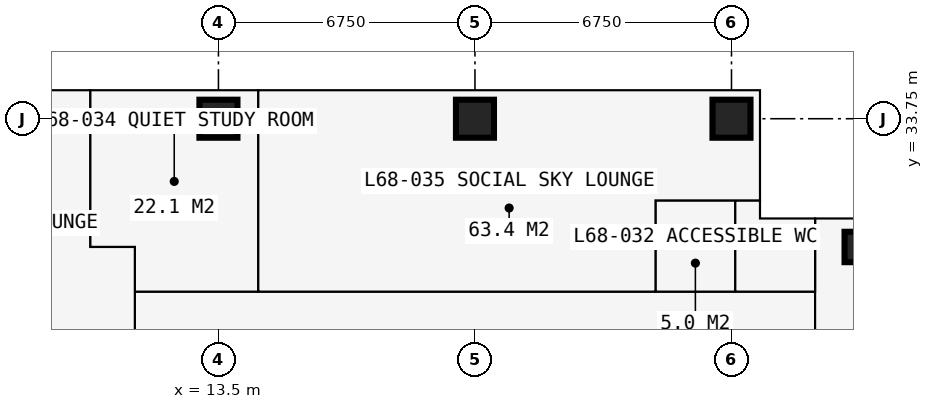
"""IFC4 building model, lengths in metres.
Left out: names, types, materials, properties, quantities, classifications, styles, units other than length and angle.
Written with IfcOpenShell. Run it as: python <this file> out.ifc"""

import sys

from ifc_helpers import new_model, si_unit, direction, frame, frame_2d, origin, origin_2d, place, context, subcontext, project, spatial, rectangle, extrude, element, fill, save


model = new_model("IFC4")
c1 = context("Model", 3, precision=1e-05, world=origin(), true_north=direction((0.0, 1.0)))
c2 = subcontext(c1, "Body", "Model", "MODEL_VIEW")
j1 = project(units=[si_unit("LENGTHUNIT", "METRE"), si_unit("PLANEANGLEUNIT", "RADIAN")], contexts=[c1])
p1 = place(None, origin())
s1 = spatial("IfcSite", under=j1, at=p1, CompositionType="ELEMENT")
p2 = place(p1, origin())
s2 = spatial("IfcBuilding", under=s1, at=p2, CompositionType="ELEMENT")
p3 = place(p2, frame((0.0, 0.0, 251.1)))
s3 = spatial("IfcBuildingStorey", under=s2, at=p3, CompositionType="ELEMENT", Elevation=251.1)
for number, where, z_axis, x_axis in (
    (1, (13.5, 33.75, 0.0), (0.0, 0.0, 1.0), (1.0, 0.0, 0.0)),
    (2, (20.25, 33.75, 0.0), (0.0, 0.0, 1.0), (1.0, 0.0, 0.0)),
    (3, (27.0, 33.75, 0.0), (0.0, 0.0, 1.0), (1.0, 0.0, 0.0)),
):
    element("IfcColumn", number, at=place(p3, frame(where, z_axis=z_axis, x_axis=x_axis)), inside=s3, PredefinedType="COLUMN", context=c2, shape_type="SweptSolid", body=[
        extrude(rectangle(XDim=1.0, YDim=1.0, at=origin_2d()), origin(), (0.0, 0.0, 1.0), 3.6),
    ])
p4 = place(p3, frame((30.375, 30.375, 0.0), z_axis=(0.0, 0.0, 1.0), x_axis=(1.0, 0.0, 0.0)))
e4 = element("IfcColumn", 4, at=p4, inside=s3, PredefinedType="COLUMN", context=c2, shape_type="SweptSolid", body=[
    extrude(rectangle(XDim=0.8, YDim=0.8, at=origin_2d()), origin(), (0.0, 0.0, 1.0), 3.6),
])
p5 = place(p3, frame((31.125, 31.125, 0.0), z_axis=(0.0, 0.0, 1.0), x_axis=(-1.0, 0.0, 0.0)))
e5 = element("IfcWall", 5, at=p5, inside=s3, PredefinedType="SOLIDWALL", context=c2, shape_type="SweptSolid", body=[
    extrude(rectangle(XDim=3.375, YDim=0.3, at=frame_2d((1.688, 0.0))), origin(), (0.0, 0.0, 1.0), 3.3),
])
p6 = place(p5, frame((0.212, 0.0, 0.9)))
e6 = element("IfcOpeningElement", 6, at=p6, cuts=e5, PredefinedType="OPENING", context=c2, shape_type="SweptSolid", body=[
    extrude(rectangle(XDim=1.5, YDim=1.8, at=frame_2d((0.75, 0.9))), frame((0.0, 0.16, 0.0), z_axis=(0.0, -1.0, 0.0), x_axis=(1.0, 0.0, 0.0)), (0.0, 0.0, 1.0), 0.32),
])
p7 = place(p3, frame((27.75, 31.125, 0.0), z_axis=(0.0, 0.0, 1.0), x_axis=(0.0, 1.0, 0.0)))
e7 = element("IfcWall", 7, at=p7, inside=s3, PredefinedType="SOLIDWALL", context=c2, shape_type="SweptSolid", body=[
    extrude(rectangle(XDim=3.375, YDim=0.3, at=frame_2d((1.688, 0.0))), origin(), (0.0, 0.0, 1.0), 3.3),
])
p8 = place(p7, frame((0.788, 0.0, 0.6)))
e8 = element("IfcOpeningElement", 8, at=p8, cuts=e7, PredefinedType="OPENING", context=c2, shape_type="SweptSolid", body=[
    extrude(rectangle(XDim=1.8, YDim=2.1, at=frame_2d((0.9, 1.05))), frame((0.0, 0.16, 0.0), z_axis=(0.0, -1.0, 0.0), x_axis=(1.0, 0.0, 0.0)), (0.0, 0.0, 1.0), 0.32),
])
p9 = place(p3, frame((13.5, 34.5, 0.0), z_axis=(0.0, 0.0, 1.0), x_axis=(1.0, 0.0, 0.0)))
e9 = element("IfcWall", 9, at=p9, inside=s3, PredefinedType="SOLIDWALL", context=c2, shape_type="SweptSolid", body=[
    extrude(rectangle(XDim=6.75, YDim=0.15, at=frame_2d((3.375, 0.0))), origin(), (0.0, 0.0, 1.0), 3.3),
])
p10 = place(p9, frame((0.363, 0.0, 0.0)))
e10 = element("IfcOpeningElement", 10, at=p10, cuts=e9, PredefinedType="OPENING", context=c2, shape_type="SweptSolid", body=[
    extrude(rectangle(XDim=1.0, YDim=2.2, at=frame_2d((0.5, 1.1))), frame((0.0, 0.085, 0.0), z_axis=(0.0, -1.0, 0.0), x_axis=(1.0, 0.0, 0.0)), (0.0, 0.0, 1.0), 0.17),
])
p11 = place(p9, frame((1.725, 0.0, 0.9)))
e11 = element("IfcOpeningElement", 11, at=p11, cuts=e9, PredefinedType="OPENING", context=c2, shape_type="SweptSolid", body=[
    extrude(rectangle(XDim=1.2, YDim=1.8, at=frame_2d((0.6, 0.9))), frame((0.0, 0.085, 0.0), z_axis=(0.0, -1.0, 0.0), x_axis=(1.0, 0.0, 0.0)), (0.0, 0.0, 1.0), 0.17),
])
p12 = place(p9, frame((5.387, 0.0, 0.0)))
e12 = element("IfcOpeningElement", 12, at=p12, cuts=e9, PredefinedType="OPENING", context=c2, shape_type="SweptSolid", body=[
    extrude(rectangle(XDim=1.0, YDim=2.2, at=frame_2d((0.5, 1.1))), frame((0.0, 0.085, 0.0), z_axis=(0.0, -1.0, 0.0), x_axis=(1.0, 0.0, 0.0)), (0.0, 0.0, 1.0), 0.17),
])
p13 = place(p9, frame((3.825, 0.0, 0.9)))
e13 = element("IfcOpeningElement", 13, at=p13, cuts=e9, PredefinedType="OPENING", context=c2, shape_type="SweptSolid", body=[
    extrude(rectangle(XDim=1.2, YDim=1.8, at=frame_2d((0.6, 0.9))), frame((0.0, 0.085, 0.0), z_axis=(0.0, -1.0, 0.0), x_axis=(1.0, 0.0, 0.0)), (0.0, 0.0, 1.0), 0.17),
])
p14 = place(p3, frame((16.875, 34.6, 0.0), z_axis=(0.0, 0.0, 1.0), x_axis=(0.0, 1.0, 0.0)))
e14 = element("IfcWall", 14, at=p14, inside=s3, PredefinedType="USERDEFINED", context=c2, shape_type="SweptSolid", body=[
    extrude(rectangle(XDim=2.2, YDim=1.0, at=frame_2d((1.1, 0.0))), origin(), (0.0, 0.0, 1.0), 0.9),
])
p15 = place(p3, frame((10.125, 30.375, 0.0), z_axis=(0.0, 0.0, 1.0), x_axis=(0.0, 1.0, 0.0)))
e15 = element("IfcWall", 15, at=p15, inside=s3, PredefinedType="PARTITIONING", context=c2, shape_type="SweptSolid", body=[
    extrude(rectangle(XDim=4.109, YDim=0.15, at=frame_2d((2.054, 0.0))), origin(), (0.0, 0.0, 1.0), 3.3),
])
p16 = place(p3, frame((10.125, 30.375, 0.0), z_axis=(0.0, 0.0, 1.0), x_axis=(1.0, 0.0, 0.0)))
e16 = element("IfcWall", 16, at=p16, inside=s3, PredefinedType="PARTITIONING", context=c2, shape_type="SweptSolid", body=[
    extrude(rectangle(XDim=1.175, YDim=0.15, at=frame_2d((0.587, 0.0))), origin(), (0.0, 0.0, 1.0), 3.3),
])
p17 = place(p3, frame((11.3, 11.3, 0.0), z_axis=(0.0, 0.0, 1.0), x_axis=(0.0, 1.0, 0.0)))
e17 = element("IfcWall", 17, at=p17, inside=s3, PredefinedType="PARTITIONING", context=c2, shape_type="SweptSolid", body=[
    extrude(rectangle(XDim=19.075, YDim=0.15, at=frame_2d((9.538, 0.0))), origin(), (0.0, 0.0, 1.0), 3.3),
])
p18 = place(p17, frame((13.95, 0.0, 0.0)))
e18 = element("IfcOpeningElement", 18, at=p18, cuts=e17, PredefinedType="OPENING", context=c2, shape_type="SweptSolid", body=[
    extrude(rectangle(XDim=1.0, YDim=2.2, at=frame_2d((0.5, 1.1))), frame((0.0, 0.085, 0.0), z_axis=(0.0, -1.0, 0.0), x_axis=(1.0, 0.0, 0.0)), (0.0, 0.0, 1.0), 0.17),
])
p19 = place(p3, frame((11.3, 29.2, 0.0), z_axis=(0.0, 0.0, 1.0), x_axis=(1.0, 0.0, 0.0)))
e19 = element("IfcWall", 19, at=p19, inside=s3, PredefinedType="PARTITIONING", context=c2, shape_type="SweptSolid", body=[
    extrude(rectangle(XDim=17.9, YDim=0.2, at=frame_2d((8.95, 0.0))), origin(), (0.0, 0.0, 1.0), 3.3),
])
p20 = place(p19, frame((14.25, 0.0, 0.0)))
e20 = element("IfcOpeningElement", 20, at=p20, cuts=e19, PredefinedType="OPENING", context=c2, shape_type="SweptSolid", body=[
    extrude(rectangle(XDim=1.0, YDim=2.2, at=frame_2d((0.5, 1.1))), frame((0.0, 0.11, 0.0), z_axis=(0.0, -1.0, 0.0), x_axis=(1.0, 0.0, 0.0)), (0.0, 0.0, 1.0), 0.22),
])
p21 = place(p19, frame((16.35, 0.0, 0.0)))
e21 = element("IfcOpeningElement", 21, at=p21, cuts=e19, PredefinedType="OPENING", context=c2, shape_type="SweptSolid", body=[
    extrude(rectangle(XDim=1.0, YDim=2.2, at=frame_2d((0.5, 1.1))), frame((0.0, 0.11, 0.0), z_axis=(0.0, -1.0, 0.0), x_axis=(1.0, 0.0, 0.0)), (0.0, 0.0, 1.0), 0.22),
])
p22 = place(p19, frame((7.749, 0.0, 0.0)))
e22 = element("IfcOpeningElement", 22, at=p22, cuts=e19, PredefinedType="OPENING", context=c2, shape_type="SweptSolid", body=[
    extrude(rectangle(XDim=1.5, YDim=2.2, at=frame_2d((0.75, 1.1))), frame((0.0, 0.11, 0.0), z_axis=(0.0, -1.0, 0.0), x_axis=(1.0, 0.0, 0.0)), (0.0, 0.0, 1.0), 0.22),
])
p23 = place(p3, frame((14.549, 29.2, 0.0), z_axis=(0.0, 0.0, 1.0), x_axis=(0.0, 1.0, 0.0)))
e23 = element("IfcWall", 23, at=p23, inside=s3, PredefinedType="PARTITIONING", context=c2, shape_type="SweptSolid", body=[
    extrude(rectangle(XDim=5.225, YDim=0.15, at=frame_2d((2.613, 0.0))), origin(), (0.0, 0.0, 1.0), 3.3),
])
p24 = place(p23, frame((1.85, 0.0, 0.0)))
e24 = element("IfcOpeningElement", 24, at=p24, cuts=e23, PredefinedType="OPENING", context=c2, shape_type="SweptSolid", body=[
    extrude(rectangle(XDim=1.6, YDim=2.4, at=frame_2d((0.8, 1.2))), frame((0.0, 0.085, 0.0), z_axis=(0.0, -1.0, 0.0), x_axis=(1.0, 0.0, 0.0)), (0.0, 0.0, 1.0), 0.17),
])
p25 = place(p3, frame((25.0, 29.2, 0.0), z_axis=(0.0, 0.0, 1.0), x_axis=(0.0, 1.0, 0.0)))
e25 = element("IfcWall", 25, at=p25, inside=s3, PredefinedType="PARTITIONING", context=c2, shape_type="SweptSolid", body=[
    extrude(rectangle(XDim=2.4, YDim=0.1, at=frame_2d((1.2, 0.0))), origin(), (0.0, 0.0, 1.0), 3.3),
])
p26 = place(p3, frame((25.0, 31.6, 0.0), z_axis=(0.0, 0.0, 1.0), x_axis=(1.0, 0.0, 0.0)))
e26 = element("IfcWall", 26, at=p26, inside=s3, PredefinedType="PARTITIONING", context=c2, shape_type="SweptSolid", body=[
    extrude(rectangle(XDim=2.734, YDim=0.1, at=frame_2d((1.367, 0.0))), origin(), (0.0, 0.0, 1.0), 3.3),
])
p27 = place(p3, frame((27.1, 29.2, 0.0), z_axis=(0.0, 0.0, 1.0), x_axis=(0.0, 1.0, 0.0)))
e27 = element("IfcWall", 27, at=p27, inside=s3, PredefinedType="PARTITIONING", context=c2, shape_type="SweptSolid", body=[
    extrude(rectangle(XDim=2.4, YDim=0.1, at=frame_2d((1.2, 0.0))), origin(), (0.0, 0.0, 1.0), 2.802),
])
p28 = place(p3, frame((29.2, 11.3, 0.0), z_axis=(0.0, 0.0, 1.0), x_axis=(0.0, 1.0, 0.0)))
e28 = element("IfcWall", 28, at=p28, inside=s3, PredefinedType="PARTITIONING", context=c2, shape_type="SweptSolid", body=[
    extrude(rectangle(XDim=19.809, YDim=0.15, at=frame_2d((9.904, 0.0))), origin(), (0.0, 0.0, 1.0), 3.3),
])
p29 = place(p28, frame((0.55, 0.0, 0.0)))
e29 = element("IfcOpeningElement", 29, at=p29, cuts=e28, PredefinedType="OPENING", context=c2, shape_type="SweptSolid", body=[
    extrude(rectangle(XDim=1.0, YDim=2.2, at=frame_2d((0.5, 1.1))), frame((0.0, 0.085, 0.0), z_axis=(0.0, -1.0, 0.0), x_axis=(1.0, 0.0, 0.0)), (0.0, 0.0, 1.0), 0.17),
])
p30 = place(p28, frame((2.65, 0.0, 0.0)))
e30 = element("IfcOpeningElement", 30, at=p30, cuts=e28, PredefinedType="OPENING", context=c2, shape_type="SweptSolid", body=[
    extrude(rectangle(XDim=1.0, YDim=2.2, at=frame_2d((0.5, 1.1))), frame((0.0, 0.085, 0.0), z_axis=(0.0, -1.0, 0.0), x_axis=(1.0, 0.0, 0.0)), (0.0, 0.0, 1.0), 0.17),
])
p31 = place(p28, frame((10.3, 0.0, 0.0)))
e31 = element("IfcOpeningElement", 31, at=p31, cuts=e28, PredefinedType="OPENING", context=c2, shape_type="SweptSolid", body=[
    extrude(rectangle(XDim=1.5, YDim=2.2, at=frame_2d((0.75, 1.1))), frame((0.0, 0.085, 0.0), z_axis=(0.0, -1.0, 0.0), x_axis=(1.0, 0.0, 0.0)), (0.0, 0.0, 1.0), 0.17),
])
p32 = place(p6, origin())
e32 = element("IfcWindow", 32, at=p32, inside=s3, PartitioningType="SINGLE_PANEL", PredefinedType="WINDOW", context=c2, shape_type="SweptSolid", body=[
    extrude(rectangle(XDim=1.5, YDim=1.8, at=frame_2d((0.75, 0.9))), frame((0.0, 0.03, 0.0), z_axis=(0.0, -1.0, 0.0), x_axis=(1.0, 0.0, 0.0)), (0.0, 0.0, 1.0), 0.06),
])
fill(e6, e32)
p33 = place(p8, origin())
e33 = element("IfcWindow", 33, at=p33, inside=s3, PartitioningType="SINGLE_PANEL", PredefinedType="WINDOW", context=c2, shape_type="SweptSolid", body=[
    extrude(rectangle(XDim=1.8, YDim=2.1, at=frame_2d((0.9, 1.05))), frame((0.0, 0.03, 0.0), z_axis=(0.0, -1.0, 0.0), x_axis=(1.0, 0.0, 0.0)), (0.0, 0.0, 1.0), 0.06),
])
fill(e8, e33)
p34 = place(p10, origin())
e34 = element("IfcDoor", 34, at=p34, inside=s3, OperationType="SINGLE_SWING_LEFT", PredefinedType="DOOR", context=c2, shape_type="SweptSolid", body=[
    extrude(rectangle(XDim=1.0, YDim=2.2, at=frame_2d((0.5, 1.1))), frame((0.0, 0.025, 0.0), z_axis=(0.0, -1.0, 0.0), x_axis=(1.0, 0.0, 0.0)), (0.0, 0.0, 1.0), 0.05),
])
fill(e10, e34)
p35 = place(p11, origin())
e35 = element("IfcWindow", 35, at=p35, inside=s3, PartitioningType="SINGLE_PANEL", PredefinedType="WINDOW", context=c2, shape_type="SweptSolid", body=[
    extrude(rectangle(XDim=1.2, YDim=1.8, at=frame_2d((0.6, 0.9))), frame((0.0, 0.03, 0.0), z_axis=(0.0, -1.0, 0.0), x_axis=(1.0, 0.0, 0.0)), (0.0, 0.0, 1.0), 0.06),
])
fill(e11, e35)
p36 = place(p12, origin())
e36 = element("IfcDoor", 36, at=p36, inside=s3, OperationType="SINGLE_SWING_RIGHT", PredefinedType="DOOR", context=c2, shape_type="SweptSolid", body=[
    extrude(rectangle(XDim=1.0, YDim=2.2, at=frame_2d((0.5, 1.1))), frame((0.0, 0.025, 0.0), z_axis=(0.0, -1.0, 0.0), x_axis=(1.0, 0.0, 0.0)), (0.0, 0.0, 1.0), 0.05),
])
fill(e12, e36)
p37 = place(p13, origin())
e37 = element("IfcWindow", 37, at=p37, inside=s3, PartitioningType="SINGLE_PANEL", PredefinedType="WINDOW", context=c2, shape_type="SweptSolid", body=[
    extrude(rectangle(XDim=1.2, YDim=1.8, at=frame_2d((0.6, 0.9))), frame((0.0, 0.03, 0.0), z_axis=(0.0, -1.0, 0.0), x_axis=(1.0, 0.0, 0.0)), (0.0, 0.0, 1.0), 0.06),
])
fill(e13, e37)
p38 = place(p20, origin())
e38 = element("IfcDoor", 38, at=p38, inside=s3, OperationType="SINGLE_SWING_LEFT", PredefinedType="DOOR", context=c2, shape_type="SweptSolid", body=[
    extrude(rectangle(XDim=1.0, YDim=2.2, at=frame_2d((0.5, 1.1))), frame((0.0, 0.025, 0.0), z_axis=(0.0, -1.0, 0.0), x_axis=(1.0, 0.0, 0.0)), (0.0, 0.0, 1.0), 0.05),
])
fill(e20, e38)
p39 = place(p21, origin())
e39 = element("IfcDoor", 39, at=p39, inside=s3, OperationType="SINGLE_SWING_LEFT", PredefinedType="DOOR", context=c2, shape_type="SweptSolid", body=[
    extrude(rectangle(XDim=1.0, YDim=2.2, at=frame_2d((0.5, 1.1))), frame((0.0, 0.025, 0.0), z_axis=(0.0, -1.0, 0.0), x_axis=(1.0, 0.0, 0.0)), (0.0, 0.0, 1.0), 0.05),
])
fill(e21, e39)
p40 = place(p24, origin())
e40 = element("IfcDoor", 40, at=p40, inside=s3, OperationType="DOUBLE_DOOR_SINGLE_SWING", PredefinedType="DOOR", context=c2, shape_type="SweptSolid", body=[
    extrude(rectangle(XDim=1.6, YDim=2.4, at=frame_2d((0.8, 1.2))), frame((0.0, 0.025, 0.0), z_axis=(0.0, -1.0, 0.0), x_axis=(1.0, 0.0, 0.0)), (0.0, 0.0, 1.0), 0.05),
])
fill(e24, e40)
p41 = place(p22, origin())
e41 = element("IfcDoor", 41, at=p41, inside=s3, OperationType="DOUBLE_DOOR_SINGLE_SWING", PredefinedType="DOOR", context=c2, shape_type="SweptSolid", body=[
    extrude(rectangle(XDim=1.5, YDim=2.2, at=frame_2d((0.75, 1.1))), frame((0.0, 0.025, 0.0), z_axis=(0.0, -1.0, 0.0), x_axis=(1.0, 0.0, 0.0)), (0.0, 0.0, 1.0), 0.05),
])
fill(e22, e41)
save(model, sys.argv[1])
